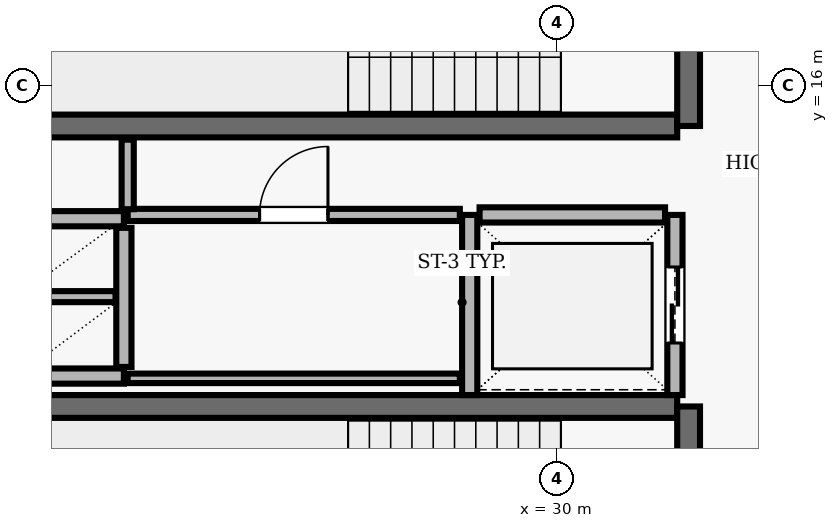
"""IFC4 building model, lengths in metres.
Left out: names, types, materials, properties, quantities, classifications, styles, units other than length and angle.
Written with IfcOpenShell. Run it as: python <this file> out.ifc"""

import sys

from ifc_helpers import new_model, si_unit, direction, frame, frame_2d, origin, place, context, subcontext, project, spatial, rectangle, extrude, element, fill, save


model = new_model("IFC4")
c1 = context("Model", 3, precision=1e-05, world=origin(), true_north=direction((0.0, 1.0)))
c2 = subcontext(c1, "Body", "Model", "MODEL_VIEW")
j1 = project(units=[si_unit("LENGTHUNIT", "METRE"), si_unit("PLANEANGLEUNIT", "RADIAN")], contexts=[c1])
p1 = place(None, origin())
s1 = spatial("IfcSite", under=j1, at=p1, CompositionType="ELEMENT")
p2 = place(p1, origin())
s2 = spatial("IfcBuilding", under=s1, at=p2, CompositionType="ELEMENT")
p3 = place(p2, frame((0.0, 0.0, 267.7)))
s3 = spatial("IfcBuildingStorey", under=s2, at=p3, CompositionType="ELEMENT", Elevation=267.7)
p4 = place(p3, frame((23.22, 15.47, 0.0), z_axis=(0.0, 0.0, 1.0), x_axis=(1.0, 0.0, 0.0)))
e1 = element("IfcWall", 1, at=p4, inside=s3, PredefinedType="SHEAR", context=c2, shape_type="SweptSolid", body=[
    extrude(rectangle(XDim=8.36, YDim=0.3, at=frame_2d((4.18, 0.0))), origin(), (0.0, 0.0, 1.0), 3.69),
])
p5 = place(p3, frame((31.73, 15.47, 0.0), z_axis=(0.0, 0.0, 1.0), x_axis=(0.0, 1.0, 0.0)))
e2 = element("IfcWall", 2, at=p5, inside=s3, PredefinedType="SHEAR", context=c2, shape_type="SweptSolid", body=[
    extrude(rectangle(XDim=3.51, YDim=0.3, at=frame_2d((1.755, 0.0))), origin(), (0.0, 0.0, 1.0), 3.69),
])
p6 = place(p5, frame((1.18, 0.0, 0.0)))
e3 = element("IfcOpeningElement", 3, at=p6, cuts=e2, PredefinedType="OPENING", context=c2, shape_type="SweptSolid", body=[
    extrude(rectangle(XDim=1.15, YDim=2.15, at=frame_2d((0.575, 1.075))), frame((0.0, 0.16, 0.0), z_axis=(0.0, -1.0, 0.0), x_axis=(1.0, 0.0, 0.0)), (0.0, 0.0, 1.0), 0.32),
])
p7 = place(p3, frame((31.58, 11.78, 0.0), z_axis=(0.0, 0.0, 1.0), x_axis=(-1.0, 0.0, 0.0)))
e4 = element("IfcWall", 4, at=p7, inside=s3, PredefinedType="SHEAR", context=c2, shape_type="SweptSolid", body=[
    extrude(rectangle(XDim=8.36, YDim=0.3, at=frame_2d((4.18, 0.0))), origin(), (0.0, 0.0, 1.0), 3.69),
])
p8 = place(p3, frame((31.73, 8.27, 0.0), z_axis=(0.0, 0.0, 1.0), x_axis=(0.0, 1.0, 0.0)))
e5 = element("IfcWall", 5, at=p8, inside=s3, PredefinedType="SHEAR", context=c2, shape_type="SweptSolid", body=[
    extrude(rectangle(XDim=3.51, YDim=0.3, at=frame_2d((1.755, 0.0))), origin(), (0.0, 0.0, 1.0), 3.69),
])
p9 = place(p8, frame((1.18, 0.0, 0.0)))
e6 = element("IfcOpeningElement", 6, at=p9, cuts=e5, PredefinedType="OPENING", context=c2, shape_type="SweptSolid", body=[
    extrude(rectangle(XDim=1.15, YDim=2.15, at=frame_2d((0.575, 1.075))), frame((0.0, 0.16, 0.0), z_axis=(0.0, -1.0, 0.0), x_axis=(1.0, 0.0, 0.0)), (0.0, 0.0, 1.0), 0.32),
])
p10 = place(p3, frame((28.85, 14.3, 0.0), z_axis=(0.0, 0.0, 1.0), x_axis=(0.0, -1.0, 0.0)))
e7 = element("IfcWall", 7, at=p10, inside=s3, PredefinedType="SOLIDWALL", context=c2, shape_type="SweptSolid", body=[
    extrude(rectangle(XDim=2.37, YDim=0.2, at=frame_2d((1.185, 0.0))), origin(), (0.0, 0.0, 1.0), 3.69),
])
p11 = place(p3, frame((31.55, 11.93, 0.0), z_axis=(0.0, 0.0, 1.0), x_axis=(0.0, 1.0, 0.0)))
e8 = element("IfcWall", 8, at=p11, inside=s3, PredefinedType="SOLIDWALL", context=c2, shape_type="SweptSolid", body=[
    extrude(rectangle(XDim=2.37, YDim=0.2, at=frame_2d((1.185, 0.0))), origin(), (0.0, 0.0, 1.0), 3.69),
])
p12 = place(p11, frame((0.685, 0.0, 0.0)))
e9 = element("IfcOpeningElement", 9, at=p12, cuts=e8, PredefinedType="OPENING", context=c2, shape_type="SweptSolid", body=[
    extrude(rectangle(XDim=1.0, YDim=2.1, at=frame_2d((0.5, 1.05))), frame((0.0, 0.11, 0.0), z_axis=(0.0, -1.0, 0.0), x_axis=(1.0, 0.0, 0.0)), (0.0, 0.0, 1.0), 0.22),
])
p13 = place(p3, frame((31.42, 14.3, 0.0), z_axis=(0.0, 0.0, 1.0), x_axis=(-1.0, 0.0, 0.0)))
e10 = element("IfcWall", 10, at=p13, inside=s3, PredefinedType="SOLIDWALL", context=c2, shape_type="SweptSolid", body=[
    extrude(rectangle(XDim=2.44, YDim=0.2, at=frame_2d((1.22, 0.0))), origin(), (0.0, 0.0, 1.0), 3.69),
])
for number, where, z_axis, x_axis in (
    (11, (22.9, 14.25, 0.0), (0.0, 0.0, 1.0), (1.0, 0.0, 0.0)),
    (12, (22.9, 12.18, 0.0), (0.0, 0.0, 1.0), (1.0, 0.0, 0.0)),
):
    element("IfcWall", number, at=place(p3, frame(where, z_axis=z_axis, x_axis=x_axis)), inside=s3, PredefinedType="SOLIDWALL", context=c2, shape_type="SweptSolid", body=[
        extrude(rectangle(XDim=1.4, YDim=0.2, at=frame_2d((0.7, 0.0))), origin(), (0.0, 0.0, 1.0), 3.69),
    ])
p14 = place(p3, frame((24.3, 12.3, 0.0), z_axis=(0.0, 0.0, 1.0), x_axis=(0.0, 1.0, 0.0)))
e13 = element("IfcWall", 13, at=p14, inside=s3, PredefinedType="SOLIDWALL", context=c2, shape_type="SweptSolid", body=[
    extrude(rectangle(XDim=1.83, YDim=0.2, at=frame_2d((0.915, 0.0))), origin(), (0.0, 0.0, 1.0), 3.69),
])
p15 = place(p3, frame((23.01, 13.225, 0.0), z_axis=(0.0, 0.0, 1.0), x_axis=(1.0, 0.0, 0.0)))
e14 = element("IfcWall", 14, at=p15, inside=s3, PredefinedType="PARTITIONING", context=c2, shape_type="SweptSolid", body=[
    extrude(rectangle(XDim=1.18, YDim=0.145, at=frame_2d((0.59, 0.0))), origin(), (0.0, 0.0, 1.0), 3.69),
])
p16 = place(p3, frame((24.35, 12.15, 0.0), z_axis=(0.0, 0.0, 1.0), x_axis=(1.0, 0.0, 0.0)))
e15 = element("IfcWall", 15, at=p16, inside=s3, PredefinedType="PARTITIONING", context=c2, shape_type="SweptSolid", body=[
    extrude(rectangle(XDim=4.37, YDim=0.125, at=frame_2d((2.185, 0.0))), origin(), (0.0, 0.0, 1.0), 3.69),
])
p17 = place(p3, frame((24.35, 14.3, 0.0), z_axis=(0.0, 0.0, 1.0), x_axis=(1.0, 0.0, 0.0)))
e16 = element("IfcWall", 16, at=p17, inside=s3, PredefinedType="PARTITIONING", context=c2, shape_type="SweptSolid", body=[
    extrude(rectangle(XDim=4.37, YDim=0.16, at=frame_2d((2.185, 0.0))), origin(), (0.0, 0.0, 1.0), 3.69),
])
p18 = place(p17, frame((1.735, 0.0, 0.0)))
e17 = element("IfcOpeningElement", 17, at=p18, cuts=e16, PredefinedType="OPENING", context=c2, shape_type="SweptSolid", body=[
    extrude(rectangle(XDim=0.9, YDim=2.1, at=frame_2d((0.45, 1.05))), frame((0.0, 0.09, 0.0), z_axis=(0.0, -1.0, 0.0), x_axis=(1.0, 0.0, 0.0)), (0.0, 0.0, 1.0), 0.18),
])
p19 = place(p3, frame((24.35, 15.29, 0.0), z_axis=(0.0, 0.0, 1.0), x_axis=(0.0, -1.0, 0.0)))
e18 = element("IfcWall", 18, at=p19, inside=s3, PredefinedType="PARTITIONING", context=c2, shape_type="SweptSolid", body=[
    extrude(rectangle(XDim=0.915, YDim=0.16, at=frame_2d((0.458, 0.0))), origin(), (0.0, 0.0, 1.0), 3.69),
])
p20 = place(p12, origin())
e19 = element("IfcDoor", 19, at=p20, inside=s3, OperationType="DOUBLE_DOOR_SLIDING", PredefinedType="DOOR", context=c2, shape_type="SweptSolid", body=[
    extrude(rectangle(XDim=1.0, YDim=2.1, at=frame_2d((0.5, 1.05))), frame((0.0, 0.025, 0.0), z_axis=(0.0, -1.0, 0.0), x_axis=(1.0, 0.0, 0.0)), (0.0, 0.0, 1.0), 0.05),
])
fill(e9, e19)
p21 = place(p18, origin())
e20 = element("IfcDoor", 20, at=p21, inside=s3, OperationType="SINGLE_SWING_RIGHT", PredefinedType="DOOR", context=c2, shape_type="SweptSolid", body=[
    extrude(rectangle(XDim=0.9, YDim=2.1, at=frame_2d((0.45, 1.05))), frame((0.0, 0.025, 0.0), z_axis=(0.0, -1.0, 0.0), x_axis=(1.0, 0.0, 0.0)), (0.0, 0.0, 1.0), 0.05),
])
fill(e17, e20)
save(model, sys.argv[1])
